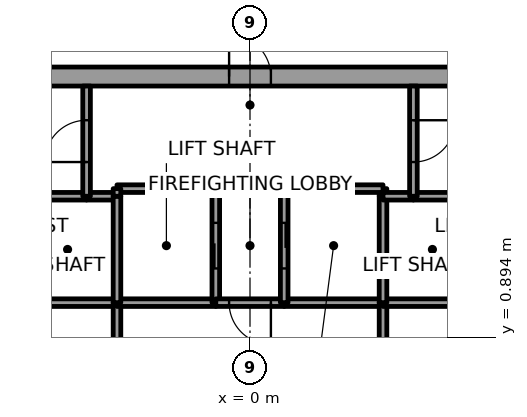
"""IFC4 building model, lengths in metres.
Left out: names, types, materials, properties, quantities, classifications, styles, units other than length and angle.
Written with IfcOpenShell. Run it as: python <this file> out.ifc"""

import sys

from ifc_helpers import new_model, si_unit, direction, frame, frame_2d, origin, place, context, subcontext, project, spatial, rectangle, extrude, element, fill, save


model = new_model("IFC4")
c1 = context("Model", 3, precision=1e-05, world=origin(), true_north=direction((0.0, 1.0)))
c2 = subcontext(c1, "Body", "Model", "MODEL_VIEW")
j1 = project(units=[si_unit("LENGTHUNIT", "METRE"), si_unit("PLANEANGLEUNIT", "RADIAN")], contexts=[c1])
p1 = place(None, origin())
s1 = spatial("IfcSite", under=j1, at=p1, CompositionType="ELEMENT")
p2 = place(p1, origin())
s2 = spatial("IfcBuilding", under=s1, at=p2, CompositionType="ELEMENT")
p3 = place(p2, frame((0.0, 0.0, 22.2)))
s3 = spatial("IfcBuildingStorey", under=s2, at=p3, CompositionType="ELEMENT", Elevation=22.2)
p4 = place(p3, frame((-11.0, 7.75, 0.0), z_axis=(0.0, 0.0, 1.0), x_axis=(1.0, 0.0, 0.0)))
e1 = element("IfcWall", 1, at=p4, inside=s3, PredefinedType="SHEAR", context=c2, shape_type="SweptSolid", body=[
    extrude(rectangle(XDim=22.0, YDim=0.5, at=frame_2d((11.0, 0.0))), origin(), (0.0, 0.0, 1.0), 6.6),
])
p5 = place(p4, frame((10.45, 0.0, 0.0)))
e2 = element("IfcOpeningElement", 2, at=p5, cuts=e1, PredefinedType="OPENING", context=c2, shape_type="SweptSolid", body=[
    extrude(rectangle(XDim=1.1, YDim=2.1, at=frame_2d((0.55, 1.05))), frame((0.0, 0.25, 0.0), z_axis=(0.0, -1.0, 0.0), x_axis=(1.0, 0.0, 0.0)), (0.0, 0.0, 1.0), 0.5),
])
p6 = place(p3, frame((-3.5, 1.8, 0.0), z_axis=(0.0, 0.0, 1.0), x_axis=(-1.0, 0.0, 0.0)))
e3 = element("IfcWall", 3, at=p6, inside=s3, PredefinedType="SOLIDWALL", context=c2, shape_type="SweptSolid", body=[
    extrude(rectangle(XDim=2.6, YDim=0.2, at=frame_2d((1.3, 0.0))), origin(), (0.0, 0.0, 1.0), 6.35),
])
p7 = place(p3, frame((-4.3, 4.6, 0.0), z_axis=(0.0, 0.0, 1.0), x_axis=(-1.0, 0.0, 0.0)))
e4 = element("IfcWall", 4, at=p7, inside=s3, PredefinedType="SOLIDWALL", context=c2, shape_type="SweptSolid", body=[
    extrude(rectangle(XDim=1.8, YDim=0.2, at=frame_2d((0.9, 0.0))), origin(), (0.0, 0.0, 1.0), 6.35),
])
p8 = place(p3, frame((-3.5, 4.6, 0.0), z_axis=(0.0, 0.0, 1.0), x_axis=(-1.0, 0.0, 0.0)))
e5 = element("IfcWall", 5, at=p8, inside=s3, PredefinedType="SOLIDWALL", context=c2, shape_type="SweptSolid", body=[
    extrude(rectangle(XDim=0.8, YDim=0.2, at=frame_2d((0.4, 0.0))), origin(), (0.0, 0.0, 1.0), 6.35),
])
p9 = place(p3, frame((-4.3, 4.6, 0.0), z_axis=(0.0, 0.0, 1.0), x_axis=(0.0, 1.0, 0.0)))
e6 = element("IfcWall", 6, at=p9, inside=s3, PredefinedType="SOLIDWALL", context=c2, shape_type="SweptSolid", body=[
    extrude(rectangle(XDim=2.9, YDim=0.2, at=frame_2d((1.45, 0.0))), origin(), (0.0, 0.0, 1.0), 6.35),
])
p10 = place(p9, frame((0.9, 0.0, 0.0)))
e7 = element("IfcOpeningElement", 7, at=p10, cuts=e6, PredefinedType="OPENING", context=c2, shape_type="SweptSolid", body=[
    extrude(rectangle(XDim=1.1, YDim=2.4, at=frame_2d((0.55, 1.2))), frame((0.0, 0.1, 0.0), z_axis=(0.0, -1.0, 0.0), x_axis=(1.0, 0.0, 0.0)), (0.0, 0.0, 1.0), 0.2),
])
p11 = place(p3, frame((-3.5, 1.8, 0.0), z_axis=(0.0, 0.0, 1.0), x_axis=(0.0, -1.0, 0.0)))
e8 = element("IfcWall", 8, at=p11, inside=s3, PredefinedType="SOLIDWALL", context=c2, shape_type="SweptSolid", body=[
    extrude(rectangle(XDim=3.6, YDim=0.2, at=frame_2d((1.8, 0.0))), origin(), (0.0, 0.0, 1.0), 6.35),
])
p12 = place(p11, frame((1.05, 0.0, 0.0)))
e9 = element("IfcOpeningElement", 9, at=p12, cuts=e8, PredefinedType="OPENING", context=c2, shape_type="SweptSolid", body=[
    extrude(rectangle(XDim=1.5, YDim=2.4, at=frame_2d((0.75, 1.2))), frame((0.0, 0.1, 0.0), z_axis=(0.0, -1.0, 0.0), x_axis=(1.0, 0.0, 0.0)), (0.0, 0.0, 1.0), 0.2),
])
p13 = place(p3, frame((-0.9, 1.8, 0.0), z_axis=(0.0, 0.0, 1.0), x_axis=(-1.0, 0.0, 0.0)))
e10 = element("IfcWall", 10, at=p13, inside=s3, PredefinedType="SOLIDWALL", context=c2, shape_type="SweptSolid", body=[
    extrude(rectangle(XDim=2.6, YDim=0.2, at=frame_2d((1.3, 0.0))), origin(), (0.0, 0.0, 1.0), 6.35),
])
p14 = place(p3, frame((-3.5, 4.6, 0.0), z_axis=(0.0, 0.0, 1.0), x_axis=(0.0, -1.0, 0.0)))
e11 = element("IfcWall", 11, at=p14, inside=s3, PredefinedType="SOLIDWALL", context=c2, shape_type="SweptSolid", body=[
    extrude(rectangle(XDim=2.8, YDim=0.2, at=frame_2d((1.4, 0.0))), origin(), (0.0, 0.0, 1.0), 6.35),
])
p15 = place(p3, frame((-0.9, 1.8, 0.0), z_axis=(0.0, 0.0, 1.0), x_axis=(0.0, 1.0, 0.0)))
e12 = element("IfcWall", 12, at=p15, inside=s3, PredefinedType="SOLIDWALL", context=c2, shape_type="SweptSolid", body=[
    extrude(rectangle(XDim=3.0, YDim=0.2, at=frame_2d((1.5, 0.0))), origin(), (0.0, 0.0, 1.0), 6.35),
])
p16 = place(p15, frame((0.9, 0.0, 0.0)))
e13 = element("IfcOpeningElement", 13, at=p16, cuts=e12, PredefinedType="OPENING", context=c2, shape_type="SweptSolid", body=[
    extrude(rectangle(XDim=1.2, YDim=2.1, at=frame_2d((0.6, 1.05))), frame((0.0, 0.1, 0.0), z_axis=(0.0, -1.0, 0.0), x_axis=(1.0, 0.0, 0.0)), (0.0, 0.0, 1.0), 0.2),
])
p17 = place(p3, frame((-0.9, 4.8, 0.0), z_axis=(0.0, 0.0, 1.0), x_axis=(-1.0, 0.0, 0.0)))
e14 = element("IfcWall", 14, at=p17, inside=s3, PredefinedType="SOLIDWALL", context=c2, shape_type="SweptSolid", body=[
    extrude(rectangle(XDim=2.6, YDim=0.2, at=frame_2d((1.3, 0.0))), origin(), (0.0, 0.0, 1.0), 6.35),
])
p18 = place(p3, frame((-3.5, 4.8, 0.0), z_axis=(0.0, 0.0, 1.0), x_axis=(0.0, -1.0, 0.0)))
e15 = element("IfcWall", 15, at=p18, inside=s3, PredefinedType="SOLIDWALL", context=c2, shape_type="SweptSolid", body=[
    extrude(rectangle(XDim=0.2, YDim=0.2, at=frame_2d((0.1, 0.0))), origin(), (0.0, 0.0, 1.0), 6.35),
])
p19 = place(p3, frame((0.9, 1.8, 0.0), z_axis=(0.0, 0.0, 1.0), x_axis=(-1.0, 0.0, 0.0)))
e16 = element("IfcWall", 16, at=p19, inside=s3, PredefinedType="SOLIDWALL", context=c2, shape_type="SweptSolid", body=[
    extrude(rectangle(XDim=1.8, YDim=0.2, at=frame_2d((0.9, 0.0))), origin(), (0.0, 0.0, 1.0), 6.35),
])
p20 = place(p19, frame((0.35, 0.0, 0.0)))
e17 = element("IfcOpeningElement", 17, at=p20, cuts=e16, PredefinedType="OPENING", context=c2, shape_type="SweptSolid", body=[
    extrude(rectangle(XDim=1.1, YDim=2.4, at=frame_2d((0.55, 1.2))), frame((0.0, 0.1, 0.0), z_axis=(0.0, -1.0, 0.0), x_axis=(1.0, 0.0, 0.0)), (0.0, 0.0, 1.0), 0.2),
])
p21 = place(p3, frame((3.5, 1.8, 0.0), z_axis=(0.0, 0.0, 1.0), x_axis=(-1.0, 0.0, 0.0)))
e18 = element("IfcWall", 18, at=p21, inside=s3, PredefinedType="SOLIDWALL", context=c2, shape_type="SweptSolid", body=[
    extrude(rectangle(XDim=2.6, YDim=0.2, at=frame_2d((1.3, 0.0))), origin(), (0.0, 0.0, 1.0), 6.35),
])
p22 = place(p3, frame((3.5, 4.6, 0.0), z_axis=(0.0, 0.0, 1.0), x_axis=(0.0, 1.0, 0.0)))
e19 = element("IfcWall", 19, at=p22, inside=s3, PredefinedType="SOLIDWALL", context=c2, shape_type="SweptSolid", body=[
    extrude(rectangle(XDim=0.2, YDim=0.2, at=frame_2d((0.1, 0.0))), origin(), (0.0, 0.0, 1.0), 6.35),
])
p23 = place(p3, frame((3.5, 4.8, 0.0), z_axis=(0.0, 0.0, 1.0), x_axis=(-1.0, 0.0, 0.0)))
e20 = element("IfcWall", 20, at=p23, inside=s3, PredefinedType="SOLIDWALL", context=c2, shape_type="SweptSolid", body=[
    extrude(rectangle(XDim=2.6, YDim=0.2, at=frame_2d((1.3, 0.0))), origin(), (0.0, 0.0, 1.0), 6.35),
])
p24 = place(p3, frame((0.9, 4.8, 0.0), z_axis=(0.0, 0.0, 1.0), x_axis=(0.0, -1.0, 0.0)))
e21 = element("IfcWall", 21, at=p24, inside=s3, PredefinedType="SOLIDWALL", context=c2, shape_type="SweptSolid", body=[
    extrude(rectangle(XDim=3.0, YDim=0.2, at=frame_2d((1.5, 0.0))), origin(), (0.0, 0.0, 1.0), 6.35),
])
p25 = place(p24, frame((0.9, 0.0, 0.0)))
e22 = element("IfcOpeningElement", 22, at=p25, cuts=e21, PredefinedType="OPENING", context=c2, shape_type="SweptSolid", body=[
    extrude(rectangle(XDim=1.2, YDim=2.1, at=frame_2d((0.6, 1.05))), frame((0.0, 0.1, 0.0), z_axis=(0.0, -1.0, 0.0), x_axis=(1.0, 0.0, 0.0)), (0.0, 0.0, 1.0), 0.2),
])
p26 = place(p3, frame((3.5, -1.8, 0.0), z_axis=(0.0, 0.0, 1.0), x_axis=(0.0, 1.0, 0.0)))
e23 = element("IfcWall", 23, at=p26, inside=s3, PredefinedType="SOLIDWALL", context=c2, shape_type="SweptSolid", body=[
    extrude(rectangle(XDim=3.6, YDim=0.2, at=frame_2d((1.8, 0.0))), origin(), (0.0, 0.0, 1.0), 6.35),
])
p27 = place(p26, frame((1.05, 0.0, 0.0)))
e24 = element("IfcOpeningElement", 24, at=p27, cuts=e23, PredefinedType="OPENING", context=c2, shape_type="SweptSolid", body=[
    extrude(rectangle(XDim=1.5, YDim=2.4, at=frame_2d((0.75, 1.2))), frame((0.0, 0.1, 0.0), z_axis=(0.0, -1.0, 0.0), x_axis=(1.0, 0.0, 0.0)), (0.0, 0.0, 1.0), 0.2),
])
p28 = place(p3, frame((6.1, 1.8, 0.0), z_axis=(0.0, 0.0, 1.0), x_axis=(-1.0, 0.0, 0.0)))
e25 = element("IfcWall", 25, at=p28, inside=s3, PredefinedType="SOLIDWALL", context=c2, shape_type="SweptSolid", body=[
    extrude(rectangle(XDim=2.6, YDim=0.2, at=frame_2d((1.3, 0.0))), origin(), (0.0, 0.0, 1.0), 6.35),
])
p29 = place(p3, frame((3.5, 1.8, 0.0), z_axis=(0.0, 0.0, 1.0), x_axis=(0.0, 1.0, 0.0)))
e26 = element("IfcWall", 26, at=p29, inside=s3, PredefinedType="SOLIDWALL", context=c2, shape_type="SweptSolid", body=[
    extrude(rectangle(XDim=2.8, YDim=0.2, at=frame_2d((1.4, 0.0))), origin(), (0.0, 0.0, 1.0), 6.35),
])
p30 = place(p3, frame((4.3, 4.6, 0.0), z_axis=(0.0, 0.0, 1.0), x_axis=(-1.0, 0.0, 0.0)))
e27 = element("IfcWall", 27, at=p30, inside=s3, PredefinedType="SOLIDWALL", context=c2, shape_type="SweptSolid", body=[
    extrude(rectangle(XDim=0.8, YDim=0.2, at=frame_2d((0.4, 0.0))), origin(), (0.0, 0.0, 1.0), 6.35),
])
p31 = place(p3, frame((6.1, 4.6, 0.0), z_axis=(0.0, 0.0, 1.0), x_axis=(-1.0, 0.0, 0.0)))
e28 = element("IfcWall", 28, at=p31, inside=s3, PredefinedType="SOLIDWALL", context=c2, shape_type="SweptSolid", body=[
    extrude(rectangle(XDim=1.8, YDim=0.2, at=frame_2d((0.9, 0.0))), origin(), (0.0, 0.0, 1.0), 6.35),
])
p32 = place(p3, frame((4.3, 7.5, 0.0), z_axis=(0.0, 0.0, 1.0), x_axis=(0.0, -1.0, 0.0)))
e29 = element("IfcWall", 29, at=p32, inside=s3, PredefinedType="SOLIDWALL", context=c2, shape_type="SweptSolid", body=[
    extrude(rectangle(XDim=2.9, YDim=0.2, at=frame_2d((1.45, 0.0))), origin(), (0.0, 0.0, 1.0), 6.35),
])
p33 = place(p32, frame((0.9, 0.0, 0.0)))
e30 = element("IfcOpeningElement", 30, at=p33, cuts=e29, PredefinedType="OPENING", context=c2, shape_type="SweptSolid", body=[
    extrude(rectangle(XDim=1.1, YDim=2.4, at=frame_2d((0.55, 1.2))), frame((0.0, 0.1, 0.0), z_axis=(0.0, -1.0, 0.0), x_axis=(1.0, 0.0, 0.0)), (0.0, 0.0, 1.0), 0.2),
])
p34 = place(p16, origin())
e31 = element("IfcDoor", 31, at=p34, inside=s3, OperationType="SLIDING_TO_LEFT", PredefinedType="DOOR", context=c2, shape_type="SweptSolid", body=[
    extrude(rectangle(XDim=1.2, YDim=2.1, at=frame_2d((0.6, 1.05))), frame((0.0, 0.025, 0.0), z_axis=(0.0, -1.0, 0.0), x_axis=(1.0, 0.0, 0.0)), (0.0, 0.0, 1.0), 0.05),
])
fill(e13, e31)
p35 = place(p25, origin())
e32 = element("IfcDoor", 32, at=p35, inside=s3, OperationType="SLIDING_TO_LEFT", PredefinedType="DOOR", context=c2, shape_type="SweptSolid", body=[
    extrude(rectangle(XDim=1.2, YDim=2.1, at=frame_2d((0.6, 1.05))), frame((0.0, 0.025, 0.0), z_axis=(0.0, -1.0, 0.0), x_axis=(1.0, 0.0, 0.0)), (0.0, 0.0, 1.0), 0.05),
])
fill(e22, e32)
p36 = place(p20, origin())
e33 = element("IfcDoor", 33, at=p36, inside=s3, OperationType="SINGLE_SWING_LEFT", PredefinedType="DOOR", context=c2, shape_type="SweptSolid", body=[
    extrude(rectangle(XDim=1.1, YDim=2.4, at=frame_2d((0.55, 1.2))), frame((0.0, 0.025, 0.0), z_axis=(0.0, -1.0, 0.0), x_axis=(1.0, 0.0, 0.0)), (0.0, 0.0, 1.0), 0.05),
])
fill(e17, e33)
p37 = place(p10, origin())
e34 = element("IfcDoor", 34, at=p37, inside=s3, OperationType="SINGLE_SWING_LEFT", PredefinedType="DOOR", context=c2, shape_type="SweptSolid", body=[
    extrude(rectangle(XDim=1.1, YDim=2.4, at=frame_2d((0.55, 1.2))), frame((0.0, 0.025, 0.0), z_axis=(0.0, -1.0, 0.0), x_axis=(1.0, 0.0, 0.0)), (0.0, 0.0, 1.0), 0.05),
])
fill(e7, e34)
p38 = place(p33, origin())
e35 = element("IfcDoor", 35, at=p38, inside=s3, OperationType="SINGLE_SWING_RIGHT", PredefinedType="DOOR", context=c2, shape_type="SweptSolid", body=[
    extrude(rectangle(XDim=1.1, YDim=2.4, at=frame_2d((0.55, 1.2))), frame((0.0, 0.025, 0.0), z_axis=(0.0, -1.0, 0.0), x_axis=(1.0, 0.0, 0.0)), (0.0, 0.0, 1.0), 0.05),
])
fill(e30, e35)
p39 = place(p5, origin())
e36 = element("IfcDoor", 36, at=p39, inside=s3, OperationType="SINGLE_SWING_LEFT", PredefinedType="DOOR", context=c2, shape_type="SweptSolid", body=[
    extrude(rectangle(XDim=1.1, YDim=2.1, at=frame_2d((0.55, 1.05))), frame((0.0, 0.025, 0.0), z_axis=(0.0, -1.0, 0.0), x_axis=(1.0, 0.0, 0.0)), (0.0, 0.0, 1.0), 0.05),
])
fill(e2, e36)
save(model, sys.argv[1])
